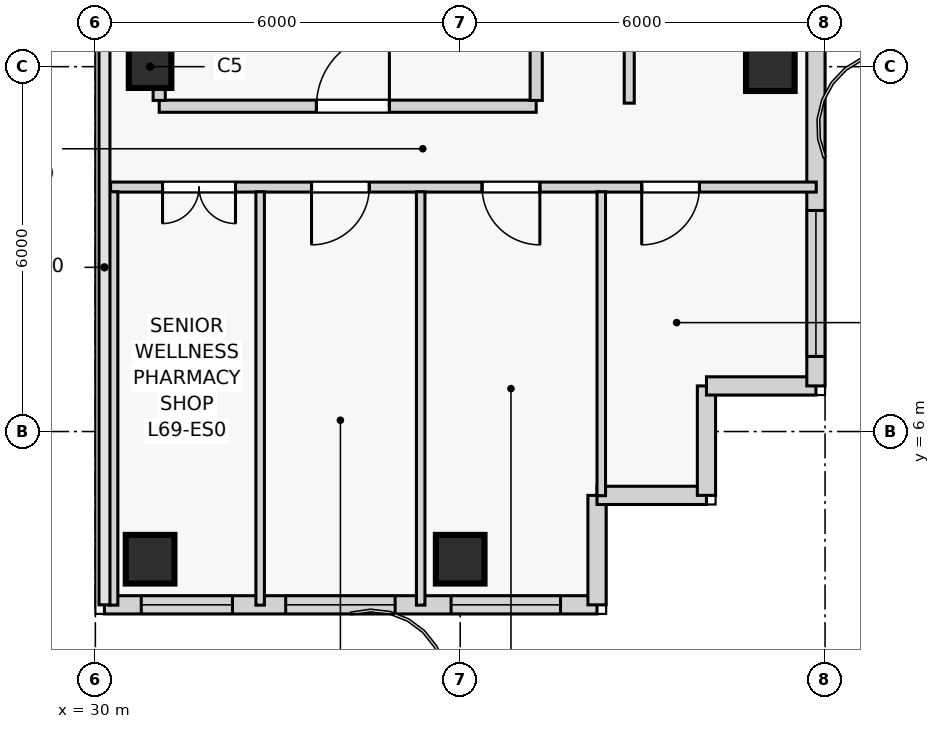
"""IFC4 building model, lengths in metres.
Left out: names, types, materials, properties, quantities, classifications, styles, units other than length and angle.
Written with IfcOpenShell. Run it as: python <this file> out.ifc"""

import sys

from ifc_helpers import new_model, si_unit, direction, frame, frame_2d, origin, origin_2d, place, context, subcontext, project, spatial, rectangle, extrude, source, transform, mapped, element, fill, save


model = new_model("IFC4")
c1 = context("Model", 3, precision=1e-05, world=origin(), true_north=direction((0.0, 1.0)))
c2 = subcontext(c1, "Body", "Model", "MODEL_VIEW")
j1 = project(units=[si_unit("LENGTHUNIT", "METRE"), si_unit("PLANEANGLEUNIT", "RADIAN")], contexts=[c1])
p1 = place(None, origin())
s1 = spatial("IfcSite", under=j1, at=p1, CompositionType="ELEMENT")
p2 = place(p1, origin())
s2 = spatial("IfcBuilding", under=s1, at=p2, CompositionType="ELEMENT")
p3 = place(p2, frame((0.0, 0.0, 263.7)))
s3 = spatial("IfcBuildingStorey", under=s2, at=p3, CompositionType="ELEMENT", Elevation=263.7)
m1 = source(origin(), c2, "Body", "SweptSolid", [
    extrude(rectangle(XDim=0.8, YDim=0.8, at=origin_2d()), origin(), (0.0, 0.0, 1.0), 3.6),
])
for number, where, z_axis, x_axis in (
    (1, (30.9, 3.9, 0.0), (0.0, 0.0, 1.0), (1.0, 0.0, 0.0)),
    (2, (36.0, 3.9, 0.0), (0.0, 0.0, 1.0), (1.0, 0.0, 0.0)),
    (3, (41.1, 12.0, 0.0), (0.0, 0.0, 1.0), (1.0, 0.0, 0.0)),
):
    element("IfcColumn", number, at=place(p3, frame(where, z_axis=z_axis, x_axis=x_axis)), inside=s3, PredefinedType="COLUMN", context=c2, shape_type="MappedRepresentation", body=[
        mapped(m1, transform((0.0, 0.0, 0.0), scale=1.0)),
    ])
m2 = source(origin(), c2, "Body", "SweptSolid", [
    extrude(rectangle(XDim=0.7, YDim=0.7, at=origin_2d()), origin(), (0.0, 0.0, 1.0), 3.6),
])
p4 = place(p3, frame((30.9, 12.0, 0.0), z_axis=(0.0, 0.0, 1.0), x_axis=(1.0, 0.0, 0.0)))
e4 = element("IfcColumn", 4, at=p4, inside=s3, PredefinedType="COLUMN", context=c2, shape_type="MappedRepresentation", body=[
    mapped(m2, transform((0.0, 0.0, 0.0), scale=1.0)),
])
p5 = place(p3, frame((30.15, 3.15, 0.0), z_axis=(0.0, 0.0, 1.0), x_axis=(1.0, 0.0, 0.0)))
e5 = element("IfcWall", 5, at=p5, inside=s3, PredefinedType="SOLIDWALL", context=c2, shape_type="SweptSolid", body=[
    extrude(rectangle(XDim=8.1, YDim=0.3, at=frame_2d((4.05, 0.0))), origin(), (0.0, 0.0, 1.0), 2.95),
])
p6 = place(p5, frame((0.605, 0.0, 0.85)))
e6 = element("IfcOpeningElement", 6, at=p6, cuts=e5, PredefinedType="OPENING", context=c2, shape_type="SweptSolid", body=[
    extrude(rectangle(XDim=1.5, YDim=1.8, at=frame_2d((0.75, 0.9))), frame((0.0, 0.16, 0.0), z_axis=(0.0, -1.0, 0.0), x_axis=(1.0, 0.0, 0.0)), (0.0, 0.0, 1.0), 0.32),
])
p7 = place(p5, frame((2.98, 0.0, 0.69)))
e7 = element("IfcOpeningElement", 7, at=p7, cuts=e5, PredefinedType="OPENING", context=c2, shape_type="SweptSolid", body=[
    extrude(rectangle(XDim=1.8, YDim=2.1, at=frame_2d((0.9, 1.05))), frame((0.0, 0.16, 0.0), z_axis=(0.0, -1.0, 0.0), x_axis=(1.0, 0.0, 0.0)), (0.0, 0.0, 1.0), 0.32),
])
p8 = place(p5, frame((5.7, 0.0, 0.69)))
e8 = element("IfcOpeningElement", 8, at=p8, cuts=e5, PredefinedType="OPENING", context=c2, shape_type="SweptSolid", body=[
    extrude(rectangle(XDim=1.8, YDim=2.1, at=frame_2d((0.9, 1.05))), frame((0.0, 0.16, 0.0), z_axis=(0.0, -1.0, 0.0), x_axis=(1.0, 0.0, 0.0)), (0.0, 0.0, 1.0), 0.32),
])
for number, where, z_axis, x_axis in (
    (9, (38.25, 3.15, 0.0), (0.0, 0.0, 1.0), (0.0, 1.0, 0.0)),
    (10, (38.25, 4.95, 0.0), (0.0, 0.0, 1.0), (1.0, 0.0, 0.0)),
    (11, (40.05, 4.95, 0.0), (0.0, 0.0, 1.0), (0.0, 1.0, 0.0)),
    (12, (40.05, 6.75, 0.0), (0.0, 0.0, 1.0), (1.0, 0.0, 0.0)),
):
    element("IfcWall", number, at=place(p3, frame(where, z_axis=z_axis, x_axis=x_axis)), inside=s3, PredefinedType="SOLIDWALL", context=c2, shape_type="SweptSolid", body=[
        extrude(rectangle(XDim=1.8, YDim=0.3, at=frame_2d((0.9, 0.0))), origin(), (0.0, 0.0, 1.0), 2.95),
    ])
p9 = place(p3, frame((41.85, 6.75, 0.0), z_axis=(0.0, 0.0, 1.0), x_axis=(0.0, 1.0, 0.0)))
e13 = element("IfcWall", 13, at=p9, inside=s3, PredefinedType="SOLIDWALL", context=c2, shape_type="SweptSolid", body=[
    extrude(rectangle(XDim=10.71, YDim=0.3, at=frame_2d((5.355, 0.0))), origin(), (0.0, 0.0, 1.0), 2.95),
])
p10 = place(p9, frame((0.485, 0.0, 0.69)))
e14 = element("IfcOpeningElement", 14, at=p10, cuts=e13, PredefinedType="OPENING", context=c2, shape_type="SweptSolid", body=[
    extrude(rectangle(XDim=2.4, YDim=2.1, at=frame_2d((1.2, 1.05))), frame((0.0, 0.16, 0.0), z_axis=(0.0, -1.0, 0.0), x_axis=(1.0, 0.0, 0.0)), (0.0, 0.0, 1.0), 0.32),
])
p11 = place(p9, frame((5.74, 0.0, 0.69)))
e15 = element("IfcOpeningElement", 15, at=p11, cuts=e13, PredefinedType="OPENING", context=c2, shape_type="SweptSolid", body=[
    extrude(rectangle(XDim=2.4, YDim=2.1, at=frame_2d((1.2, 1.05))), frame((0.0, 0.16, 0.0), z_axis=(0.0, -1.0, 0.0), x_axis=(1.0, 0.0, 0.0)), (0.0, 0.0, 1.0), 0.32),
])
p12 = place(p3, frame((31.05, 11.35, 0.0), z_axis=(0.0, 0.0, 1.0), x_axis=(1.0, 0.0, 0.0)))
e16 = element("IfcWall", 16, at=p12, inside=s3, PredefinedType="PARTITIONING", context=c2, shape_type="SweptSolid", body=[
    extrude(rectangle(XDim=6.2, YDim=0.2, at=frame_2d((3.1, 0.0))), origin(), (0.0, 0.0, 1.0), 2.95),
])
p13 = place(p12, frame((2.586, 0.0, 0.0)))
e17 = element("IfcOpeningElement", 17, at=p13, cuts=e16, PredefinedType="OPENING", context=c2, shape_type="SweptSolid", body=[
    extrude(rectangle(XDim=1.2, YDim=2.2, at=frame_2d((0.6, 1.1))), frame((0.0, 0.11, 0.0), z_axis=(0.0, -1.0, 0.0), x_axis=(1.0, 0.0, 0.0)), (0.0, 0.0, 1.0), 0.22),
])
p14 = place(p3, frame((31.05, 11.445, 0.0), z_axis=(0.0, 0.0, 1.0), x_axis=(0.0, 1.0, 0.0)))
e18 = element("IfcWall", 18, at=p14, inside=s3, PredefinedType="PARTITIONING", context=c2, shape_type="SweptSolid", body=[
    extrude(rectangle(XDim=3.335, YDim=0.2, at=frame_2d((1.667, 0.0))), origin(), (0.0, 0.0, 1.0), 2.487),
])
p15 = place(p3, frame((37.25, 11.445, 0.0), z_axis=(0.0, 0.0, 1.0), x_axis=(0.0, 1.0, 0.0)))
e19 = element("IfcWall", 19, at=p15, inside=s3, PredefinedType="PARTITIONING", context=c2, shape_type="SweptSolid", body=[
    extrude(rectangle(XDim=3.335, YDim=0.2, at=frame_2d((1.667, 0.0))), origin(), (0.0, 0.0, 1.0), 2.95),
])
p16 = place(p3, frame((30.25, 10.02, 0.0), z_axis=(0.0, 0.0, 1.0), x_axis=(1.0, 0.0, 0.0)))
e20 = element("IfcWall", 20, at=p16, inside=s3, PredefinedType="PARTITIONING", context=c2, shape_type="SweptSolid", body=[
    extrude(rectangle(XDim=11.605, YDim=0.165, at=frame_2d((5.802, 0.0))), origin(), (0.0, 0.0, 1.0), 2.95),
])
p17 = place(p16, frame((0.855, 0.0, 0.0)))
e21 = element("IfcOpeningElement", 21, at=p17, cuts=e20, PredefinedType="OPENING", context=c2, shape_type="SweptSolid", body=[
    extrude(rectangle(XDim=1.2, YDim=2.2, at=frame_2d((0.6, 1.1))), frame((0.0, 0.093, 0.0), z_axis=(0.0, -1.0, 0.0), x_axis=(1.0, 0.0, 0.0)), (0.0, 0.0, 1.0), 0.185),
])
p18 = place(p16, frame((3.305, 0.0, 0.0)))
e22 = element("IfcOpeningElement", 22, at=p18, cuts=e20, PredefinedType="OPENING", context=c2, shape_type="SweptSolid", body=[
    extrude(rectangle(XDim=0.95, YDim=2.1, at=frame_2d((0.475, 1.05))), frame((0.0, 0.093, 0.0), z_axis=(0.0, -1.0, 0.0), x_axis=(1.0, 0.0, 0.0)), (0.0, 0.0, 1.0), 0.185),
])
p19 = place(p16, frame((6.11, 0.0, 0.0)))
e23 = element("IfcOpeningElement", 23, at=p19, cuts=e20, PredefinedType="OPENING", context=c2, shape_type="SweptSolid", body=[
    extrude(rectangle(XDim=0.95, YDim=2.1, at=frame_2d((0.475, 1.05))), frame((0.0, 0.093, 0.0), z_axis=(0.0, -1.0, 0.0), x_axis=(1.0, 0.0, 0.0)), (0.0, 0.0, 1.0), 0.185),
])
p20 = place(p16, frame((8.735, 0.0, 0.0)))
e24 = element("IfcOpeningElement", 24, at=p20, cuts=e20, PredefinedType="OPENING", context=c2, shape_type="SweptSolid", body=[
    extrude(rectangle(XDim=0.95, YDim=2.1, at=frame_2d((0.475, 1.05))), frame((0.0, 0.093, 0.0), z_axis=(0.0, -1.0, 0.0), x_axis=(1.0, 0.0, 0.0)), (0.0, 0.0, 1.0), 0.185),
])
p21 = place(p3, frame((38.78, 11.4, 0.0), z_axis=(0.0, 0.0, 1.0), x_axis=(0.0, 1.0, 0.0)))
e25 = element("IfcWall", 25, at=p21, inside=s3, PredefinedType="PARTITIONING", context=c2, shape_type="SweptSolid", body=[
    extrude(rectangle(XDim=19.05, YDim=0.165, at=frame_2d((9.525, 0.0))), origin(), (0.0, 0.0, 1.0), 2.95),
])
p22 = place(p21, frame((2.875, 0.0, 0.0)))
e26 = element("IfcOpeningElement", 26, at=p22, cuts=e25, PredefinedType="OPENING", context=c2, shape_type="SweptSolid", body=[
    extrude(rectangle(XDim=0.95, YDim=2.1, at=frame_2d((0.475, 1.05))), frame((0.0, 0.093, 0.0), z_axis=(0.0, -1.0, 0.0), x_axis=(1.0, 0.0, 0.0)), (0.0, 0.0, 1.0), 0.185),
])
p23 = place(p21, frame((12.5, 0.0, 0.0)))
e27 = element("IfcOpeningElement", 27, at=p23, cuts=e25, PredefinedType="OPENING", context=c2, shape_type="SweptSolid", body=[
    extrude(rectangle(XDim=0.95, YDim=2.1, at=frame_2d((0.475, 1.05))), frame((0.0, 0.093, 0.0), z_axis=(0.0, -1.0, 0.0), x_axis=(1.0, 0.0, 0.0)), (0.0, 0.0, 1.0), 0.185),
])
for number, where, z_axis, x_axis in (
    (28, (30.3, 3.145, 0.0), (0.0, 0.0, 1.0), (0.0, 1.0, 0.0)),
    (29, (32.71, 3.145, 0.0), (0.0, 0.0, 1.0), (0.0, 1.0, 0.0)),
    (30, (35.35, 3.145, 0.0), (0.0, 0.0, 1.0), (0.0, 1.0, 0.0)),
):
    element("IfcWall", number, at=place(p3, frame(where, z_axis=z_axis, x_axis=x_axis)), inside=s3, PredefinedType="PARTITIONING", context=c2, shape_type="SweptSolid", body=[
        extrude(rectangle(XDim=6.797, YDim=0.14, at=frame_2d((3.399, 0.0))), origin(), (0.0, 0.0, 1.0), 2.95),
    ])
p24 = place(p3, frame((38.32, 4.945, 0.0), z_axis=(0.0, 0.0, 1.0), x_axis=(0.0, 1.0, 0.0)))
e31 = element("IfcWall", 31, at=p24, inside=s3, PredefinedType="PARTITIONING", context=c2, shape_type="SweptSolid", body=[
    extrude(rectangle(XDim=4.997, YDim=0.14, at=frame_2d((2.499, 0.0))), origin(), (0.0, 0.0, 1.0), 2.95),
])
m3 = source(origin(), c2, "Body", "SweptSolid", [
    extrude(rectangle(XDim=1.5, YDim=1.8, at=frame_2d((0.75, 0.9))), frame((0.0, 0.03, 0.0), z_axis=(0.0, -1.0, 0.0), x_axis=(1.0, 0.0, 0.0)), (0.0, 0.0, 1.0), 0.06),
])
p25 = place(p6, origin())
e32 = element("IfcWindow", 32, at=p25, inside=s3, PartitioningType="SINGLE_PANEL", PredefinedType="WINDOW", context=c2, shape_type="MappedRepresentation", body=[
    mapped(m3, transform((0.0, 0.0, 0.0), scale=1.0)),
])
fill(e6, e32)
m4 = source(origin(), c2, "Body", "SweptSolid", [
    extrude(rectangle(XDim=1.8, YDim=2.1, at=frame_2d((0.9, 1.05))), frame((0.0, 0.03, 0.0), z_axis=(0.0, -1.0, 0.0), x_axis=(1.0, 0.0, 0.0)), (0.0, 0.0, 1.0), 0.06),
])
p26 = place(p7, origin())
e33 = element("IfcWindow", 33, at=p26, inside=s3, PartitioningType="SINGLE_PANEL", PredefinedType="WINDOW", context=c2, shape_type="MappedRepresentation", body=[
    mapped(m4, transform((0.0, 0.0, 0.0), scale=1.0)),
])
fill(e7, e33)
p27 = place(p8, origin())
e34 = element("IfcWindow", 34, at=p27, inside=s3, PartitioningType="SINGLE_PANEL", PredefinedType="WINDOW", context=c2, shape_type="MappedRepresentation", body=[
    mapped(m4, transform((0.0, 0.0, 0.0), scale=1.0)),
])
fill(e8, e34)
m5 = source(origin(), c2, "Body", "SweptSolid", [
    extrude(rectangle(XDim=2.4, YDim=2.1, at=frame_2d((1.2, 1.05))), frame((0.0, 0.03, 0.0), z_axis=(0.0, -1.0, 0.0), x_axis=(1.0, 0.0, 0.0)), (0.0, 0.0, 1.0), 0.06),
])
p28 = place(p10, origin())
e35 = element("IfcWindow", 35, at=p28, inside=s3, PartitioningType="SINGLE_PANEL", PredefinedType="WINDOW", context=c2, shape_type="MappedRepresentation", body=[
    mapped(m5, transform((0.0, 0.0, 0.0), scale=1.0)),
])
fill(e14, e35)
m6 = source(origin(), c2, "Body", "SweptSolid", [
    extrude(rectangle(XDim=1.2, YDim=2.2, at=frame_2d((0.6, 1.1))), frame((0.0, 0.025, 0.0), z_axis=(0.0, -1.0, 0.0), x_axis=(1.0, 0.0, 0.0)), (0.0, 0.0, 1.0), 0.05),
])
p29 = place(p13, origin())
e36 = element("IfcDoor", 36, at=p29, inside=s3, OperationType="SINGLE_SWING_RIGHT", PredefinedType="DOOR", context=c2, shape_type="MappedRepresentation", body=[
    mapped(m6, transform((0.0, 0.0, 0.0), scale=1.0)),
])
fill(e17, e36)
p30 = place(p17, frame((1.2, 0.0, 0.0), z_axis=(0.0, 0.0, 1.0), x_axis=(-1.0, 0.0, 0.0)))
e37 = element("IfcDoor", 37, at=p30, inside=s3, OperationType="DOUBLE_DOOR_SINGLE_SWING", PredefinedType="DOOR", context=c2, shape_type="MappedRepresentation", body=[
    mapped(m6, transform((0.0, 0.0, 0.0), scale=1.0)),
])
fill(e21, e37)
m7 = source(origin(), c2, "Body", "SweptSolid", [
    extrude(rectangle(XDim=0.95, YDim=2.1, at=frame_2d((0.475, 1.05))), frame((0.0, 0.025, 0.0), z_axis=(0.0, -1.0, 0.0), x_axis=(1.0, 0.0, 0.0)), (0.0, 0.0, 1.0), 0.05),
])
p31 = place(p18, frame((0.95, 0.0, 0.0), z_axis=(0.0, 0.0, 1.0), x_axis=(-1.0, 0.0, 0.0)))
e38 = element("IfcDoor", 38, at=p31, inside=s3, OperationType="SINGLE_SWING_RIGHT", PredefinedType="DOOR", context=c2, shape_type="MappedRepresentation", body=[
    mapped(m7, transform((0.0, 0.0, 0.0), scale=1.0)),
])
fill(e22, e38)
p32 = place(p19, frame((0.95, 0.0, 0.0), z_axis=(0.0, 0.0, 1.0), x_axis=(-1.0, 0.0, 0.0)))
e39 = element("IfcDoor", 39, at=p32, inside=s3, OperationType="SINGLE_SWING_LEFT", PredefinedType="DOOR", context=c2, shape_type="MappedRepresentation", body=[
    mapped(m7, transform((0.0, 0.0, 0.0), scale=1.0)),
])
fill(e23, e39)
p33 = place(p20, frame((0.95, 0.0, 0.0), z_axis=(0.0, 0.0, 1.0), x_axis=(-1.0, 0.0, 0.0)))
e40 = element("IfcDoor", 40, at=p33, inside=s3, OperationType="SINGLE_SWING_RIGHT", PredefinedType="DOOR", context=c2, shape_type="MappedRepresentation", body=[
    mapped(m7, transform((0.0, 0.0, 0.0), scale=1.0)),
])
fill(e24, e40)
save(model, sys.argv[1])
